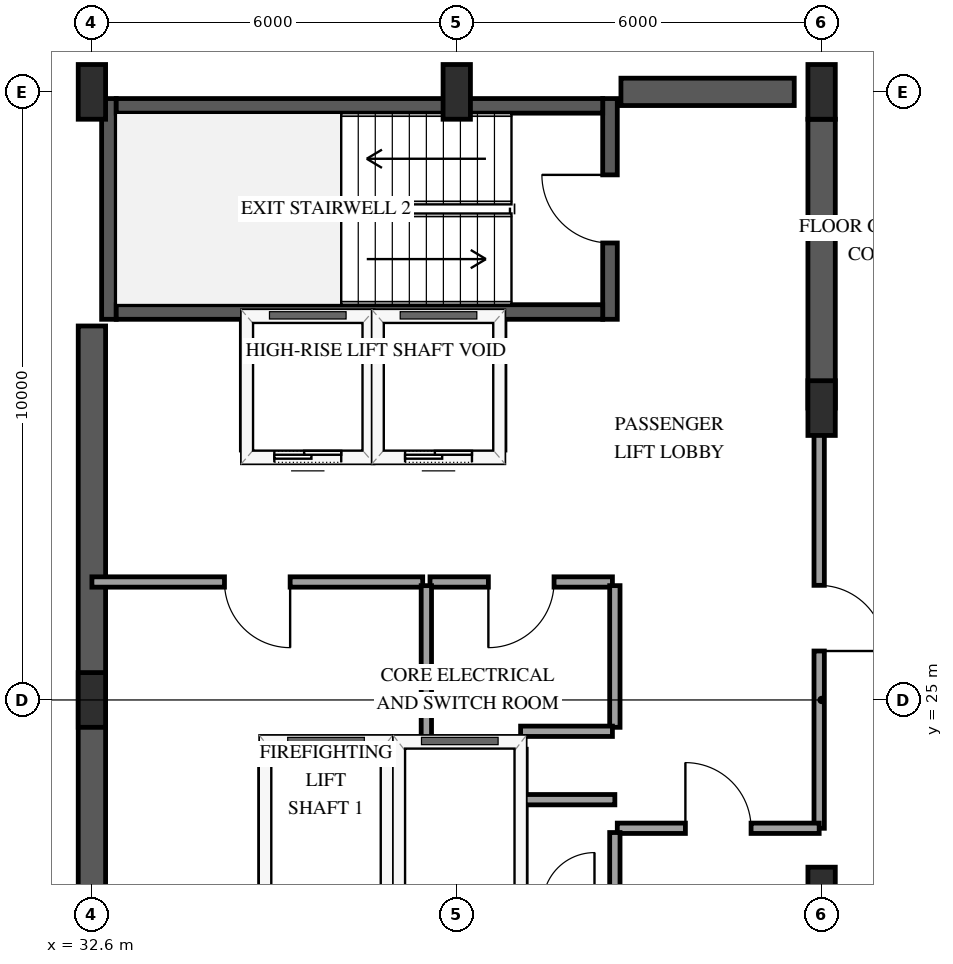
"""IFC4 building model, lengths in metres.
Left out: names, types, materials, properties, quantities, classifications, styles, units other than length and angle.
Written with IfcOpenShell. Run it as: python <this file> out.ifc"""

import sys

from ifc_helpers import new_model, si_unit, direction, frame, frame_2d, origin, origin_2d, place, context, subcontext, project, spatial, rectangle, extrude, element, fill, save


model = new_model("IFC4")
c1 = context("Model", 3, precision=1e-05, world=origin(), true_north=direction((0.0, 1.0)))
c2 = subcontext(c1, "Body", "Model", "MODEL_VIEW")
j1 = project(units=[si_unit("LENGTHUNIT", "METRE"), si_unit("PLANEANGLEUNIT", "RADIAN")], contexts=[c1])
p1 = place(None, origin())
s1 = spatial("IfcSite", under=j1, at=p1, CompositionType="ELEMENT")
p2 = place(p1, origin())
s2 = spatial("IfcBuilding", under=s1, at=p2, CompositionType="ELEMENT")
p3 = place(p2, frame((0.0, 0.0, 280.0)))
s3 = spatial("IfcBuildingStorey", under=s2, at=p3, CompositionType="ELEMENT", Elevation=280.0)
p4 = place(p3, frame((32.88, 31.26, 0.0), z_axis=(0.0, 0.0, 1.0), x_axis=(0.0, 1.0, 0.0)))
e1 = element("IfcWall", 1, at=p4, inside=s3, PredefinedType="SHEAR", context=c2, shape_type="SweptSolid", body=[
    extrude(rectangle(XDim=3.63, YDim=0.24, at=frame_2d((1.815, 0.0))), origin(), (0.0, 0.0, 1.0), 3.75),
])
p5 = place(p3, frame((41.12, 31.26, 0.0), z_axis=(0.0, 0.0, 1.0), x_axis=(0.0, 1.0, 0.0)))
e2 = element("IfcWall", 2, at=p5, inside=s3, PredefinedType="SHEAR", context=c2, shape_type="SweptSolid", body=[
    extrude(rectangle(XDim=3.63, YDim=0.24, at=frame_2d((1.815, 0.0))), origin(), (0.0, 0.0, 1.0), 3.75),
])
p6 = place(p5, frame((1.255, 0.0, 0.0)))
e3 = element("IfcOpeningElement", 3, at=p6, cuts=e2, PredefinedType="OPENING", context=c2, shape_type="SweptSolid", body=[
    extrude(rectangle(XDim=1.12, YDim=2.15, at=frame_2d((0.56, 1.075))), frame((0.0, 0.13, 0.0), z_axis=(0.0, -1.0, 0.0), x_axis=(1.0, 0.0, 0.0)), (0.0, 0.0, 1.0), 0.26),
])
for number, where, z_axis, x_axis in (
    (4, (33.0, 31.38, 0.0), (0.0, 0.0, 1.0), (1.0, 0.0, 0.0)),
    (5, (33.0, 34.77, 0.0), (0.0, 0.0, 1.0), (1.0, 0.0, 0.0)),
):
    element("IfcWall", number, at=place(p3, frame(where, z_axis=z_axis, x_axis=x_axis)), inside=s3, PredefinedType="SHEAR", context=c2, shape_type="SweptSolid", body=[
        extrude(rectangle(XDim=8.0, YDim=0.24, at=frame_2d((4.0, 0.0))), origin(), (0.0, 0.0, 1.0), 3.75),
    ])
p7 = place(p3, frame((32.6, 18.85, 0.0), z_axis=(0.0, 0.0, 1.0), x_axis=(0.0, 1.0, 0.0)))
e6 = element("IfcWall", 6, at=p7, inside=s3, PredefinedType="SHEAR", context=c2, shape_type="SweptSolid", body=[
    extrude(rectangle(XDim=12.3, YDim=0.45, at=frame_2d((6.15, 0.0))), origin(), (0.0, 0.0, 1.0), 3.75),
])
p8 = place(p3, frame((41.3, 35.0, 0.0), z_axis=(0.0, 0.0, 1.0), x_axis=(1.0, 0.0, 0.0)))
e7 = element("IfcWall", 7, at=p8, inside=s3, PredefinedType="SHEAR", context=c2, shape_type="SweptSolid", body=[
    extrude(rectangle(XDim=2.85, YDim=0.45, at=frame_2d((1.425, 0.0))), origin(), (0.0, 0.0, 1.0), 3.75),
])
p9 = place(p3, frame((44.6, 29.8, 0.0), z_axis=(0.0, 0.0, 1.0), x_axis=(0.0, 1.0, 0.0)))
e8 = element("IfcWall", 8, at=p9, inside=s3, PredefinedType="SHEAR", context=c2, shape_type="SweptSolid", body=[
    extrude(rectangle(XDim=4.75, YDim=0.45, at=frame_2d((2.375, 0.0))), origin(), (0.0, 0.0, 1.0), 3.75),
])
for number, where, z_axis, x_axis in (
    (9, (32.6, 25.0, 0.0), (0.0, 0.0, 1.0), (1.0, 0.0, 0.0)),
    (10, (32.6, 35.0, 0.0), (0.0, 0.0, 1.0), (1.0, 0.0, 0.0)),
    (11, (38.6, 35.0, 0.0), (0.0, 0.0, 1.0), (1.0, 0.0, 0.0)),
    (12, (44.6, 21.8, 0.0), (0.0, 0.0, 1.0), (1.0, 0.0, 0.0)),
    (13, (44.6, 29.8, 0.0), (0.0, 0.0, 1.0), (1.0, 0.0, 0.0)),
    (14, (44.6, 35.0, 0.0), (0.0, 0.0, 1.0), (1.0, 0.0, 0.0)),
):
    element("IfcColumn", number, at=place(p3, frame(where, z_axis=z_axis, x_axis=x_axis)), inside=s3, PredefinedType="PILASTER", context=c2, shape_type="SweptSolid", body=[
        extrude(rectangle(XDim=0.45, YDim=0.9, at=origin_2d()), origin(), (0.0, 0.0, 1.0), 3.75),
    ])
p10 = place(p3, frame((35.45, 24.3, 0.0), z_axis=(0.0, 0.0, 1.0), x_axis=(1.0, 0.0, 0.0)))
e15 = element("IfcWall", 15, at=p10, inside=s3, PredefinedType="SOLIDWALL", context=c2, shape_type="SweptSolid", body=[
    extrude(rectangle(XDim=2.0, YDim=0.185, at=frame_2d((1.0, 0.0))), origin(), (0.0, 0.0, 1.0), 3.41),
])
for number, where, z_axis, x_axis in (
    (16, (35.45, 21.81, 0.0), (0.0, 0.0, 1.0), (0.0, 1.0, 0.0)),
    (17, (37.45, 21.81, 0.0), (0.0, 0.0, 1.0), (0.0, 1.0, 0.0)),
):
    element("IfcWall", number, at=place(p3, frame(where, z_axis=z_axis, x_axis=x_axis)), inside=s3, PredefinedType="SOLIDWALL", context=c2, shape_type="SweptSolid", body=[
        extrude(rectangle(XDim=2.38, YDim=0.185, at=frame_2d((1.19, 0.0))), origin(), (0.0, 0.0, 1.0), 3.41),
    ])
p11 = place(p3, frame((37.65, 24.3, 0.0), z_axis=(0.0, 0.0, 1.0), x_axis=(1.0, 0.0, 0.0)))
e18 = element("IfcWall", 18, at=p11, inside=s3, PredefinedType="SOLIDWALL", context=c2, shape_type="SweptSolid", body=[
    extrude(rectangle(XDim=2.0, YDim=0.185, at=frame_2d((1.0, 0.0))), origin(), (0.0, 0.0, 1.0), 3.41),
])
p12 = place(p3, frame((39.65, 21.81, 0.0), z_axis=(0.0, 0.0, 1.0), x_axis=(0.0, 1.0, 0.0)))
e19 = element("IfcWall", 19, at=p12, inside=s3, PredefinedType="SOLIDWALL", context=c2, shape_type="SweptSolid", body=[
    extrude(rectangle(XDim=2.38, YDim=0.185, at=frame_2d((1.19, 0.0))), origin(), (0.0, 0.0, 1.0), 3.41),
])
p13 = place(p3, frame((35.15, 29.0, 0.0), z_axis=(0.0, 0.0, 1.0), x_axis=(1.0, 0.0, 0.0)))
e20 = element("IfcWall", 20, at=p13, inside=s3, PredefinedType="SOLIDWALL", context=c2, shape_type="SweptSolid", body=[
    extrude(rectangle(XDim=2.0, YDim=0.185, at=frame_2d((1.0, 0.0))), origin(), (0.0, 0.0, 1.0), 3.41),
])
p14 = place(p13, frame((0.45, 0.0, 0.0)))
e21 = element("IfcOpeningElement", 21, at=p14, cuts=e20, PredefinedType="OPENING", context=c2, shape_type="SweptSolid", body=[
    extrude(rectangle(XDim=1.1, YDim=2.15, at=frame_2d((0.55, 1.075))), frame((0.0, 0.103, 0.0), z_axis=(0.0, -1.0, 0.0), x_axis=(1.0, 0.0, 0.0)), (0.0, 0.0, 1.0), 0.205),
])
for number, where, z_axis, x_axis in (
    (22, (35.15, 29.11, 0.0), (0.0, 0.0, 1.0), (0.0, 1.0, 0.0)),
    (23, (37.15, 29.11, 0.0), (0.0, 0.0, 1.0), (0.0, 1.0, 0.0)),
):
    element("IfcWall", number, at=place(p3, frame(where, z_axis=z_axis, x_axis=x_axis)), inside=s3, PredefinedType="SOLIDWALL", context=c2, shape_type="SweptSolid", body=[
        extrude(rectangle(XDim=2.1, YDim=0.185, at=frame_2d((1.05, 0.0))), origin(), (0.0, 0.0, 1.0), 3.41),
    ])
p15 = place(p3, frame((37.3, 29.0, 0.0), z_axis=(0.0, 0.0, 1.0), x_axis=(1.0, 0.0, 0.0)))
e24 = element("IfcWall", 24, at=p15, inside=s3, PredefinedType="SOLIDWALL", context=c2, shape_type="SweptSolid", body=[
    extrude(rectangle(XDim=2.0, YDim=0.185, at=frame_2d((1.0, 0.0))), origin(), (0.0, 0.0, 1.0), 3.41),
])
p16 = place(p15, frame((0.45, 0.0, 0.0)))
e25 = element("IfcOpeningElement", 25, at=p16, cuts=e24, PredefinedType="OPENING", context=c2, shape_type="SweptSolid", body=[
    extrude(rectangle(XDim=1.1, YDim=2.15, at=frame_2d((0.55, 1.075))), frame((0.0, 0.103, 0.0), z_axis=(0.0, -1.0, 0.0), x_axis=(1.0, 0.0, 0.0)), (0.0, 0.0, 1.0), 0.205),
])
p17 = place(p3, frame((39.3, 29.11, 0.0), z_axis=(0.0, 0.0, 1.0), x_axis=(0.0, 1.0, 0.0)))
e26 = element("IfcWall", 26, at=p17, inside=s3, PredefinedType="SOLIDWALL", context=c2, shape_type="SweptSolid", body=[
    extrude(rectangle(XDim=2.1, YDim=0.185, at=frame_2d((1.05, 0.0))), origin(), (0.0, 0.0, 1.0), 3.41),
])
p18 = place(p3, frame((44.56, 29.8, 0.0), z_axis=(0.0, 0.0, 1.0), x_axis=(0.0, -1.0, 0.0)))
e27 = element("IfcWall", 27, at=p18, inside=s3, PredefinedType="PARTITIONING", context=c2, shape_type="SweptSolid", body=[
    extrude(rectangle(XDim=6.91, YDim=0.17, at=frame_2d((3.455, 0.0))), origin(), (0.0, 0.0, 1.0), 2.45),
])
p19 = place(p18, frame((2.915, 0.0, 0.0)))
e28 = element("IfcOpeningElement", 28, at=p19, cuts=e27, PredefinedType="OPENING", context=c2, shape_type="SweptSolid", body=[
    extrude(rectangle(XDim=1.08, YDim=2.15, at=frame_2d((0.54, 1.075))), frame((0.0, 0.095, 0.0), z_axis=(0.0, -1.0, 0.0), x_axis=(1.0, 0.0, 0.0)), (0.0, 0.0, 1.0), 0.19),
])
p20 = place(p3, frame((38.04, 26.94, 0.0), z_axis=(0.0, 0.0, 1.0), x_axis=(-1.0, 0.0, 0.0)))
e29 = element("IfcWall", 29, at=p20, inside=s3, PredefinedType="PARTITIONING", context=c2, shape_type="SweptSolid", body=[
    extrude(rectangle(XDim=5.44, YDim=0.17, at=frame_2d((2.72, 0.0))), origin(), (0.0, 0.0, 1.0), 3.41),
])
p21 = place(p20, frame((2.18, 0.0, 0.0)))
e30 = element("IfcOpeningElement", 30, at=p21, cuts=e29, PredefinedType="OPENING", context=c2, shape_type="SweptSolid", body=[
    extrude(rectangle(XDim=1.08, YDim=2.15, at=frame_2d((0.54, 1.075))), frame((0.0, 0.095, 0.0), z_axis=(0.0, -1.0, 0.0), x_axis=(1.0, 0.0, 0.0)), (0.0, 0.0, 1.0), 0.19),
])
p22 = place(p3, frame((41.24, 22.89, 0.0), z_axis=(0.0, 0.0, 1.0), x_axis=(1.0, 0.0, 0.0)))
e31 = element("IfcWall", 31, at=p22, inside=s3, PredefinedType="PARTITIONING", context=c2, shape_type="SweptSolid", body=[
    extrude(rectangle(XDim=3.32, YDim=0.17, at=frame_2d((1.66, 0.0))), origin(), (0.0, 0.0, 1.0), 3.41),
])
p23 = place(p22, frame((1.12, 0.0, 0.0)))
e32 = element("IfcOpeningElement", 32, at=p23, cuts=e31, PredefinedType="OPENING", context=c2, shape_type="SweptSolid", body=[
    extrude(rectangle(XDim=1.08, YDim=2.15, at=frame_2d((0.54, 1.075))), frame((0.0, 0.095, 0.0), z_axis=(0.0, -1.0, 0.0), x_axis=(1.0, 0.0, 0.0)), (0.0, 0.0, 1.0), 0.19),
])
p24 = place(p3, frame((41.16, 26.94, 0.0), z_axis=(0.0, 0.0, 1.0), x_axis=(-1.0, 0.0, 0.0)))
e33 = element("IfcWall", 33, at=p24, inside=s3, PredefinedType="PARTITIONING", context=c2, shape_type="SweptSolid", body=[
    extrude(rectangle(XDim=3.0, YDim=0.17, at=frame_2d((1.5, 0.0))), origin(), (0.0, 0.0, 1.0), 3.41),
])
p25 = place(p24, frame((0.96, 0.0, 0.0)))
e34 = element("IfcOpeningElement", 34, at=p25, cuts=e33, PredefinedType="OPENING", context=c2, shape_type="SweptSolid", body=[
    extrude(rectangle(XDim=1.08, YDim=2.15, at=frame_2d((0.54, 1.075))), frame((0.0, 0.095, 0.0), z_axis=(0.0, -1.0, 0.0), x_axis=(1.0, 0.0, 0.0)), (0.0, 0.0, 1.0), 0.19),
])
p26 = place(p3, frame((38.1, 26.88, 0.0), z_axis=(0.0, 0.0, 1.0), x_axis=(0.0, -1.0, 0.0)))
e35 = element("IfcWall", 35, at=p26, inside=s3, PredefinedType="PARTITIONING", context=c2, shape_type="SweptSolid", body=[
    extrude(rectangle(XDim=2.58, YDim=0.17, at=frame_2d((1.29, 0.0))), origin(), (0.0, 0.0, 1.0), 3.41),
])
p27 = place(p3, frame((41.2, 24.55, 0.0), z_axis=(0.0, 0.0, 1.0), x_axis=(0.0, 1.0, 0.0)))
e36 = element("IfcWall", 36, at=p27, inside=s3, PredefinedType="PARTITIONING", context=c2, shape_type="SweptSolid", body=[
    extrude(rectangle(XDim=2.33, YDim=0.17, at=frame_2d((1.165, 0.0))), origin(), (0.0, 0.0, 1.0), 3.41),
])
p28 = place(p3, frame((39.65, 24.485, 0.0), z_axis=(0.0, 0.0, 1.0), x_axis=(1.0, 0.0, 0.0)))
e37 = element("IfcWall", 37, at=p28, inside=s3, PredefinedType="PARTITIONING", context=c2, shape_type="SweptSolid", body=[
    extrude(rectangle(XDim=1.51, YDim=0.17, at=frame_2d((0.755, 0.0))), origin(), (0.0, 0.0, 1.0), 3.41),
])
p29 = place(p3, frame((41.2, 21.7, 0.0), z_axis=(0.0, 0.0, 1.0), x_axis=(0.0, 1.0, 0.0)))
e38 = element("IfcWall", 38, at=p29, inside=s3, PredefinedType="PARTITIONING", context=c2, shape_type="SweptSolid", body=[
    extrude(rectangle(XDim=1.12, YDim=0.17, at=frame_2d((0.56, 0.0))), origin(), (0.0, 0.0, 1.0), 3.41),
])
p30 = place(p3, frame((41.2, 23.36, 0.0), z_axis=(0.0, 0.0, 1.0), x_axis=(-1.0, 0.0, 0.0)))
e39 = element("IfcWall", 39, at=p30, inside=s3, PredefinedType="PARTITIONING", context=c2, shape_type="SweptSolid", body=[
    extrude(rectangle(XDim=1.48, YDim=0.17, at=frame_2d((0.74, 0.0))), origin(), (0.0, 0.0, 1.0), 3.41),
])
p31 = place(p14, origin())
e40 = element("IfcDoor", 40, at=p31, inside=s3, OperationType="SLIDING_TO_LEFT", PredefinedType="DOOR", context=c2, shape_type="SweptSolid", body=[
    extrude(rectangle(XDim=1.1, YDim=2.15, at=frame_2d((0.55, 1.075))), frame((0.0, 0.025, 0.0), z_axis=(0.0, -1.0, 0.0), x_axis=(1.0, 0.0, 0.0)), (0.0, 0.0, 1.0), 0.05),
])
fill(e21, e40)
p32 = place(p16, origin())
e41 = element("IfcDoor", 41, at=p32, inside=s3, OperationType="SLIDING_TO_LEFT", PredefinedType="DOOR", context=c2, shape_type="SweptSolid", body=[
    extrude(rectangle(XDim=1.1, YDim=2.15, at=frame_2d((0.55, 1.075))), frame((0.0, 0.025, 0.0), z_axis=(0.0, -1.0, 0.0), x_axis=(1.0, 0.0, 0.0)), (0.0, 0.0, 1.0), 0.05),
])
fill(e25, e41)
p33 = place(p6, origin())
e42 = element("IfcDoor", 42, at=p33, inside=s3, OperationType="SINGLE_SWING_RIGHT", PredefinedType="DOOR", context=c2, shape_type="SweptSolid", body=[
    extrude(rectangle(XDim=1.12, YDim=2.15, at=frame_2d((0.56, 1.075))), frame((0.0, 0.025, 0.0), z_axis=(0.0, -1.0, 0.0), x_axis=(1.0, 0.0, 0.0)), (0.0, 0.0, 1.0), 0.05),
])
fill(e3, e42)
p34 = place(p19, origin())
e43 = element("IfcDoor", 43, at=p34, inside=s3, OperationType="SINGLE_SWING_RIGHT", PredefinedType="DOOR", context=c2, shape_type="SweptSolid", body=[
    extrude(rectangle(XDim=1.08, YDim=2.15, at=frame_2d((0.54, 1.075))), frame((0.0, 0.025, 0.0), z_axis=(0.0, -1.0, 0.0), x_axis=(1.0, 0.0, 0.0)), (0.0, 0.0, 1.0), 0.05),
])
fill(e28, e43)
p35 = place(p21, origin())
e44 = element("IfcDoor", 44, at=p35, inside=s3, OperationType="SINGLE_SWING_LEFT", PredefinedType="DOOR", context=c2, shape_type="SweptSolid", body=[
    extrude(rectangle(XDim=1.08, YDim=2.15, at=frame_2d((0.54, 1.075))), frame((0.0, 0.025, 0.0), z_axis=(0.0, -1.0, 0.0), x_axis=(1.0, 0.0, 0.0)), (0.0, 0.0, 1.0), 0.05),
])
fill(e30, e44)
p36 = place(p23, origin())
e45 = element("IfcDoor", 45, at=p36, inside=s3, OperationType="SINGLE_SWING_LEFT", PredefinedType="DOOR", context=c2, shape_type="SweptSolid", body=[
    extrude(rectangle(XDim=1.08, YDim=2.15, at=frame_2d((0.54, 1.075))), frame((0.0, 0.025, 0.0), z_axis=(0.0, -1.0, 0.0), x_axis=(1.0, 0.0, 0.0)), (0.0, 0.0, 1.0), 0.05),
])
fill(e32, e45)
p37 = place(p25, origin())
e46 = element("IfcDoor", 46, at=p37, inside=s3, OperationType="SINGLE_SWING_RIGHT", PredefinedType="DOOR", context=c2, shape_type="SweptSolid", body=[
    extrude(rectangle(XDim=1.08, YDim=2.15, at=frame_2d((0.54, 1.075))), frame((0.0, 0.025, 0.0), z_axis=(0.0, -1.0, 0.0), x_axis=(1.0, 0.0, 0.0)), (0.0, 0.0, 1.0), 0.05),
])
fill(e34, e46)
save(model, sys.argv[1])
